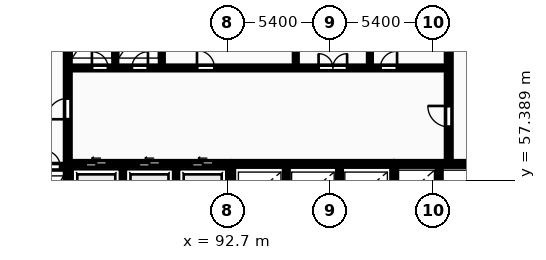
"""IFC4 building model, lengths in metres.
Left out: names, types, materials, properties, quantities, classifications, styles, units other than length and angle.
Written with IfcOpenShell. Run it as: python <this file> out.ifc"""

import sys

from ifc_helpers import new_model, si_unit, direction, frame, frame_2d, origin, place, context, subcontext, project, spatial, rectangle, extrude, element, fill, save


model = new_model("IFC4")
c1 = context("Model", 3, precision=1e-05, world=origin(), true_north=direction((0.0, 1.0)))
c2 = subcontext(c1, "Body", "Model", "MODEL_VIEW")
j1 = project(units=[si_unit("LENGTHUNIT", "METRE"), si_unit("PLANEANGLEUNIT", "RADIAN")], contexts=[c1])
p1 = place(None, origin())
s1 = spatial("IfcSite", under=j1, at=p1, CompositionType="ELEMENT")
p2 = place(p1, origin())
s2 = spatial("IfcBuilding", under=s1, at=p2, CompositionType="ELEMENT")
p3 = place(p2, frame((0.0, 0.0, 24.0)))
s3 = spatial("IfcBuildingStorey", under=s2, at=p3, CompositionType="ELEMENT", Elevation=24.0)
p4 = place(p3, frame((79.79, 58.1, 0.0), z_axis=(0.0, 0.0, 1.0), x_axis=(1.0, 0.0, 0.0)))
e1 = element("IfcWall", 1, at=p4, inside=s3, PredefinedType="SHEAR", context=c2, shape_type="SweptSolid", body=[
    extrude(rectangle(XDim=4.39, YDim=0.25, at=frame_2d((2.195, 0.0))), origin(), (0.0, 0.0, 1.0), 3.25),
])
p5 = place(p4, frame((1.05, 0.0, 0.0)))
e2 = element("IfcOpeningElement", 2, at=p5, cuts=e1, PredefinedType="OPENING", context=c2, shape_type="SweptSolid", body=[
    extrude(rectangle(XDim=1.12, YDim=2.12, at=frame_2d((0.56, 1.06))), frame((0.0, 0.135, 0.0), z_axis=(0.0, -1.0, 0.0), x_axis=(1.0, 0.0, 0.0)), (0.0, 0.0, 1.0), 0.27),
])
p6 = place(p4, frame((3.26, 0.0, 0.0)))
e3 = element("IfcOpeningElement", 3, at=p6, cuts=e1, PredefinedType="OPENING", context=c2, shape_type="SweptSolid", body=[
    extrude(rectangle(XDim=0.85, YDim=2.05, at=frame_2d((0.425, 1.025))), frame((0.0, 0.135, 0.0), z_axis=(0.0, -1.0, 0.0), x_axis=(1.0, 0.0, 0.0)), (0.0, 0.0, 1.0), 0.27),
])
p7 = place(p3, frame((84.3, 55.4, 0.0), z_axis=(0.0, 0.0, 1.0), x_axis=(0.0, 1.0, 0.0)))
e4 = element("IfcWall", 4, at=p7, inside=s3, PredefinedType="SHEAR", context=c2, shape_type="SweptSolid", body=[
    extrude(rectangle(XDim=11.6, YDim=0.25, at=frame_2d((5.8, 0.0))), origin(), (0.0, 0.0, 1.0), 3.25),
])
p8 = place(p7, frame((5.2, 0.0, 0.0)))
e5 = element("IfcOpeningElement", 5, at=p8, cuts=e4, PredefinedType="OPENING", context=c2, shape_type="SweptSolid", body=[
    extrude(rectangle(XDim=1.1, YDim=2.1, at=frame_2d((0.55, 1.05))), frame((0.0, 0.135, 0.0), z_axis=(0.0, -1.0, 0.0), x_axis=(1.0, 0.0, 0.0)), (0.0, 0.0, 1.0), 0.27),
])
for number, where, z_axis, x_axis in (
    (6, (87.2, 55.4, 0.0), (0.0, 0.0, 1.0), (0.0, 1.0, 0.0)),
    (7, (90.0, 55.4, 0.0), (0.0, 0.0, 1.0), (0.0, 1.0, 0.0)),
):
    element("IfcWall", number, at=place(p3, frame(where, z_axis=z_axis, x_axis=x_axis)), inside=s3, PredefinedType="PARTITIONING", context=c2, shape_type="SweptSolid", body=[
        extrude(rectangle(XDim=2.72, YDim=0.2, at=frame_2d((1.36, 0.0))), origin(), (0.0, 0.0, 1.0), 2.97),
    ])
p9 = place(p3, frame((84.42, 58.25, 0.0), z_axis=(0.0, 0.0, 1.0), x_axis=(1.0, 0.0, 0.0)))
e8 = element("IfcWall", 8, at=p9, inside=s3, PredefinedType="SHEAR", context=c2, shape_type="SweptSolid", body=[
    extrude(rectangle(XDim=8.36, YDim=0.25, at=frame_2d((4.18, 0.0))), origin(), (0.0, 0.0, 1.0), 3.25),
])
p10 = place(p9, frame((0.82, 0.0, 0.0)))
e9 = element("IfcOpeningElement", 9, at=p10, cuts=e8, PredefinedType="OPENING", context=c2, shape_type="SweptSolid", body=[
    extrude(rectangle(XDim=1.12, YDim=2.12, at=frame_2d((0.56, 1.06))), frame((0.0, 0.135, 0.0), z_axis=(0.0, -1.0, 0.0), x_axis=(1.0, 0.0, 0.0)), (0.0, 0.0, 1.0), 0.27),
])
p11 = place(p9, frame((3.62, 0.0, 0.0)))
e10 = element("IfcOpeningElement", 10, at=p11, cuts=e8, PredefinedType="OPENING", context=c2, shape_type="SweptSolid", body=[
    extrude(rectangle(XDim=1.12, YDim=2.12, at=frame_2d((0.56, 1.06))), frame((0.0, 0.135, 0.0), z_axis=(0.0, -1.0, 0.0), x_axis=(1.0, 0.0, 0.0)), (0.0, 0.0, 1.0), 0.27),
])
p12 = place(p9, frame((6.42, 0.0, 0.0)))
e11 = element("IfcOpeningElement", 11, at=p12, cuts=e8, PredefinedType="OPENING", context=c2, shape_type="SweptSolid", body=[
    extrude(rectangle(XDim=1.12, YDim=2.12, at=frame_2d((0.56, 1.06))), frame((0.0, 0.135, 0.0), z_axis=(0.0, -1.0, 0.0), x_axis=(1.0, 0.0, 0.0)), (0.0, 0.0, 1.0), 0.27),
])
p13 = place(p3, frame((92.9, 55.4, 0.0), z_axis=(0.0, 0.0, 1.0), x_axis=(0.0, 1.0, 0.0)))
e12 = element("IfcWall", 12, at=p13, inside=s3, PredefinedType="SHEAR", context=c2, shape_type="SweptSolid", body=[
    extrude(rectangle(XDim=2.85, YDim=0.25, at=frame_2d((1.425, 0.0))), origin(), (0.0, 0.0, 1.0), 3.25),
])
for number, where, z_axis, x_axis in (
    (13, (95.8, 55.4, 0.0), (0.0, 0.0, 1.0), (0.0, 1.0, 0.0)),
    (14, (98.6, 55.4, 0.0), (0.0, 0.0, 1.0), (0.0, 1.0, 0.0)),
):
    element("IfcWall", number, at=place(p3, frame(where, z_axis=z_axis, x_axis=x_axis)), inside=s3, PredefinedType="PARTITIONING", context=c2, shape_type="SweptSolid", body=[
        extrude(rectangle(XDim=2.72, YDim=0.2, at=frame_2d((1.36, 0.0))), origin(), (0.0, 0.0, 1.0), 2.97),
    ])
p14 = place(p3, frame((93.02, 58.25, 0.0), z_axis=(0.0, 0.0, 1.0), x_axis=(1.0, 0.0, 0.0)))
e15 = element("IfcWall", 15, at=p14, inside=s3, PredefinedType="SHEAR", context=c2, shape_type="SweptSolid", body=[
    extrude(rectangle(XDim=8.36, YDim=0.25, at=frame_2d((4.18, 0.0))), origin(), (0.0, 0.0, 1.0), 3.25),
])
p15 = place(p3, frame((101.48, 55.4, 0.0), z_axis=(0.0, 0.0, 1.0), x_axis=(0.0, 1.0, 0.0)))
e16 = element("IfcWall", 16, at=p15, inside=s3, PredefinedType="SHEAR", context=c2, shape_type="SweptSolid", body=[
    extrude(rectangle(XDim=2.85, YDim=0.25, at=frame_2d((1.425, 0.0))), origin(), (0.0, 0.0, 1.0), 3.25),
])
p16 = place(p3, frame((103.85, 55.4, 0.0), z_axis=(0.0, 0.0, 1.0), x_axis=(0.0, 1.0, 0.0)))
e17 = element("IfcWall", 17, at=p16, inside=s3, PredefinedType="PARTITIONING", context=c2, shape_type="SweptSolid", body=[
    extrude(rectangle(XDim=2.72, YDim=0.2, at=frame_2d((1.36, 0.0))), origin(), (0.0, 0.0, 1.0), 2.97),
])
p17 = place(p3, frame((101.55, 58.25, 0.0), z_axis=(0.0, 0.0, 1.0), x_axis=(1.0, 0.0, 0.0)))
e18 = element("IfcWall", 18, at=p17, inside=s3, PredefinedType="SHEAR", context=c2, shape_type="SweptSolid", body=[
    extrude(rectangle(XDim=4.6, YDim=0.25, at=frame_2d((2.3, 0.0))), origin(), (0.0, 0.0, 1.0), 3.25),
])
for number, where, z_axis, x_axis in (
    (19, (86.8, 63.4, 0.0), (0.0, 0.0, 1.0), (0.0, 1.0, 0.0)),
    (20, (89.25, 63.4, 0.0), (0.0, 0.0, 1.0), (0.0, 1.0, 0.0)),
    (21, (96.3, 63.4, 0.0), (0.0, 0.0, 1.0), (0.0, 1.0, 0.0)),
    (22, (100.2, 63.4, 0.0), (0.0, 0.0, 1.0), (0.0, 1.0, 0.0)),
):
    element("IfcWall", number, at=place(p3, frame(where, z_axis=z_axis, x_axis=x_axis)), inside=s3, PredefinedType="PARTITIONING", context=c2, shape_type="SweptSolid", body=[
        extrude(rectangle(XDim=3.6, YDim=0.15, at=frame_2d((1.8, 0.0))), origin(), (0.0, 0.0, 1.0), 2.97),
    ])
p18 = place(p3, frame((84.42, 63.3, 0.0), z_axis=(0.0, 0.0, 1.0), x_axis=(1.0, 0.0, 0.0)))
e23 = element("IfcWall", 23, at=p18, inside=s3, PredefinedType="PARTITIONING", context=c2, shape_type="SweptSolid", body=[
    extrude(rectangle(XDim=19.83, YDim=0.2, at=frame_2d((9.915, 0.0))), origin(), (0.0, 0.0, 1.0), 2.97),
])
p19 = place(p18, frame((1.15, 0.0, 0.0)))
e24 = element("IfcOpeningElement", 24, at=p19, cuts=e23, PredefinedType="OPENING", context=c2, shape_type="SweptSolid", body=[
    extrude(rectangle(XDim=0.85, YDim=2.05, at=frame_2d((0.425, 1.025))), frame((0.0, 0.11, 0.0), z_axis=(0.0, -1.0, 0.0), x_axis=(1.0, 0.0, 0.0)), (0.0, 0.0, 1.0), 0.22),
])
p20 = place(p18, frame((3.25, 0.0, 0.0)))
e25 = element("IfcOpeningElement", 25, at=p20, cuts=e23, PredefinedType="OPENING", context=c2, shape_type="SweptSolid", body=[
    extrude(rectangle(XDim=0.85, YDim=2.05, at=frame_2d((0.425, 1.025))), frame((0.0, 0.11, 0.0), z_axis=(0.0, -1.0, 0.0), x_axis=(1.0, 0.0, 0.0)), (0.0, 0.0, 1.0), 0.22),
])
p21 = place(p18, frame((13.08, 0.0, 0.0)))
e26 = element("IfcOpeningElement", 26, at=p21, cuts=e23, PredefinedType="OPENING", context=c2, shape_type="SweptSolid", body=[
    extrude(rectangle(XDim=1.5, YDim=2.2, at=frame_2d((0.75, 1.1))), frame((0.0, 0.11, 0.0), z_axis=(0.0, -1.0, 0.0), x_axis=(1.0, 0.0, 0.0)), (0.0, 0.0, 1.0), 0.22),
])
p22 = place(p18, frame((6.68, 0.0, 0.0)))
e27 = element("IfcOpeningElement", 27, at=p22, cuts=e23, PredefinedType="OPENING", context=c2, shape_type="SweptSolid", body=[
    extrude(rectangle(XDim=0.92, YDim=2.08, at=frame_2d((0.46, 1.04))), frame((0.0, 0.11, 0.0), z_axis=(0.0, -1.0, 0.0), x_axis=(1.0, 0.0, 0.0)), (0.0, 0.0, 1.0), 0.22),
])
p23 = place(p18, frame((16.33, 0.0, 0.0)))
e28 = element("IfcOpeningElement", 28, at=p23, cuts=e23, PredefinedType="OPENING", context=c2, shape_type="SweptSolid", body=[
    extrude(rectangle(XDim=0.88, YDim=2.06, at=frame_2d((0.44, 1.03))), frame((0.0, 0.11, 0.0), z_axis=(0.0, -1.0, 0.0), x_axis=(1.0, 0.0, 0.0)), (0.0, 0.0, 1.0), 0.22),
])
p24 = place(p3, frame((104.35, 58.4, 0.0), z_axis=(0.0, 0.0, 1.0), x_axis=(0.0, 1.0, 0.0)))
e29 = element("IfcWall", 29, at=p24, inside=s3, PredefinedType="SHEAR", context=c2, shape_type="SweptSolid", body=[
    extrude(rectangle(XDim=8.6, YDim=0.25, at=frame_2d((4.3, 0.0))), origin(), (0.0, 0.0, 1.0), 3.25),
])
p25 = place(p24, frame((1.8, 0.0, 0.0)))
e30 = element("IfcOpeningElement", 30, at=p25, cuts=e29, PredefinedType="OPENING", context=c2, shape_type="SweptSolid", body=[
    extrude(rectangle(XDim=1.1, YDim=2.1, at=frame_2d((0.55, 1.05))), frame((0.0, 0.135, 0.0), z_axis=(0.0, -1.0, 0.0), x_axis=(1.0, 0.0, 0.0)), (0.0, 0.0, 1.0), 0.27),
])
p26 = place(p6, origin())
e31 = element("IfcDoor", 31, at=p26, inside=s3, OperationType="SINGLE_SWING_LEFT", PredefinedType="DOOR", context=c2, shape_type="SweptSolid", body=[
    extrude(rectangle(XDim=0.85, YDim=2.05, at=frame_2d((0.425, 1.025))), frame((0.0, 0.025, 0.0), z_axis=(0.0, -1.0, 0.0), x_axis=(1.0, 0.0, 0.0)), (0.0, 0.0, 1.0), 0.05),
])
fill(e3, e31)
p27 = place(p8, origin())
e32 = element("IfcDoor", 32, at=p27, inside=s3, OperationType="SINGLE_SWING_LEFT", PredefinedType="DOOR", context=c2, shape_type="SweptSolid", body=[
    extrude(rectangle(XDim=1.1, YDim=2.1, at=frame_2d((0.55, 1.05))), frame((0.0, 0.025, 0.0), z_axis=(0.0, -1.0, 0.0), x_axis=(1.0, 0.0, 0.0)), (0.0, 0.0, 1.0), 0.05),
])
fill(e5, e32)
p28 = place(p10, origin())
e33 = element("IfcDoor", 33, at=p28, inside=s3, OperationType="SLIDING_TO_LEFT", PredefinedType="DOOR", context=c2, shape_type="SweptSolid", body=[
    extrude(rectangle(XDim=1.12, YDim=2.12, at=frame_2d((0.56, 1.06))), frame((0.0, 0.025, 0.0), z_axis=(0.0, -1.0, 0.0), x_axis=(1.0, 0.0, 0.0)), (0.0, 0.0, 1.0), 0.05),
])
fill(e9, e33)
p29 = place(p11, origin())
e34 = element("IfcDoor", 34, at=p29, inside=s3, OperationType="SLIDING_TO_LEFT", PredefinedType="DOOR", context=c2, shape_type="SweptSolid", body=[
    extrude(rectangle(XDim=1.12, YDim=2.12, at=frame_2d((0.56, 1.06))), frame((0.0, 0.025, 0.0), z_axis=(0.0, -1.0, 0.0), x_axis=(1.0, 0.0, 0.0)), (0.0, 0.0, 1.0), 0.05),
])
fill(e10, e34)
p30 = place(p12, origin())
e35 = element("IfcDoor", 35, at=p30, inside=s3, OperationType="SLIDING_TO_LEFT", PredefinedType="DOOR", context=c2, shape_type="SweptSolid", body=[
    extrude(rectangle(XDim=1.12, YDim=2.12, at=frame_2d((0.56, 1.06))), frame((0.0, 0.025, 0.0), z_axis=(0.0, -1.0, 0.0), x_axis=(1.0, 0.0, 0.0)), (0.0, 0.0, 1.0), 0.05),
])
fill(e11, e35)
p31 = place(p19, origin())
e36 = element("IfcDoor", 36, at=p31, inside=s3, OperationType="SINGLE_SWING_LEFT", PredefinedType="DOOR", context=c2, shape_type="SweptSolid", body=[
    extrude(rectangle(XDim=0.85, YDim=2.05, at=frame_2d((0.425, 1.025))), frame((0.0, 0.025, 0.0), z_axis=(0.0, -1.0, 0.0), x_axis=(1.0, 0.0, 0.0)), (0.0, 0.0, 1.0), 0.05),
])
fill(e24, e36)
p32 = place(p20, origin())
e37 = element("IfcDoor", 37, at=p32, inside=s3, OperationType="SINGLE_SWING_RIGHT", PredefinedType="DOOR", context=c2, shape_type="SweptSolid", body=[
    extrude(rectangle(XDim=0.85, YDim=2.05, at=frame_2d((0.425, 1.025))), frame((0.0, 0.025, 0.0), z_axis=(0.0, -1.0, 0.0), x_axis=(1.0, 0.0, 0.0)), (0.0, 0.0, 1.0), 0.05),
])
fill(e25, e37)
p33 = place(p21, origin())
e38 = element("IfcDoor", 38, at=p33, inside=s3, OperationType="DOUBLE_DOOR_SINGLE_SWING", PredefinedType="DOOR", context=c2, shape_type="SweptSolid", body=[
    extrude(rectangle(XDim=1.5, YDim=2.2, at=frame_2d((0.75, 1.1))), frame((0.0, 0.025, 0.0), z_axis=(0.0, -1.0, 0.0), x_axis=(1.0, 0.0, 0.0)), (0.0, 0.0, 1.0), 0.05),
])
fill(e26, e38)
p34 = place(p22, origin())
e39 = element("IfcDoor", 39, at=p34, inside=s3, OperationType="SINGLE_SWING_LEFT", PredefinedType="DOOR", context=c2, shape_type="SweptSolid", body=[
    extrude(rectangle(XDim=0.92, YDim=2.08, at=frame_2d((0.46, 1.04))), frame((0.0, 0.025, 0.0), z_axis=(0.0, -1.0, 0.0), x_axis=(1.0, 0.0, 0.0)), (0.0, 0.0, 1.0), 0.05),
])
fill(e27, e39)
p35 = place(p23, origin())
e40 = element("IfcDoor", 40, at=p35, inside=s3, OperationType="SINGLE_SWING_RIGHT", PredefinedType="DOOR", context=c2, shape_type="SweptSolid", body=[
    extrude(rectangle(XDim=0.88, YDim=2.06, at=frame_2d((0.44, 1.03))), frame((0.0, 0.025, 0.0), z_axis=(0.0, -1.0, 0.0), x_axis=(1.0, 0.0, 0.0)), (0.0, 0.0, 1.0), 0.05),
])
fill(e28, e40)
p36 = place(p25, origin())
e41 = element("IfcDoor", 41, at=p36, inside=s3, OperationType="SINGLE_SWING_RIGHT", PredefinedType="DOOR", context=c2, shape_type="SweptSolid", body=[
    extrude(rectangle(XDim=1.1, YDim=2.1, at=frame_2d((0.55, 1.05))), frame((0.0, 0.025, 0.0), z_axis=(0.0, -1.0, 0.0), x_axis=(1.0, 0.0, 0.0)), (0.0, 0.0, 1.0), 0.05),
])
fill(e30, e41)
save(model, sys.argv[1])
